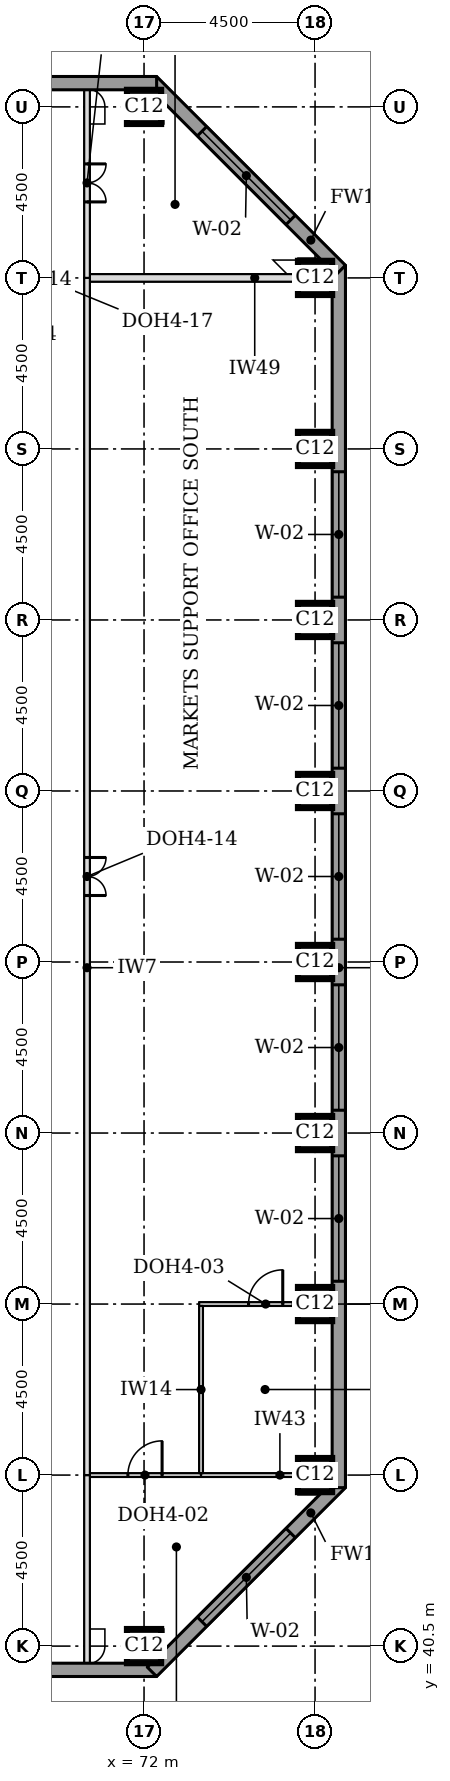
"""IFC4 building model, lengths in metres.
Left out: names, types, materials, properties, quantities, classifications, styles, units other than length and angle.
Written with IfcOpenShell. Run it as: python <this file> out.ifc"""

import sys

from ifc_helpers import new_model, si_unit, direction, frame, frame_2d, origin, origin_2d, place, context, subcontext, project, spatial, rectangle, extrude, element, fill, save


model = new_model("IFC4")
c1 = context("Model", 3, precision=1e-05, world=origin(), true_north=direction((0.0, 1.0)))
c2 = subcontext(c1, "Body", "Model", "MODEL_VIEW")
j1 = project(units=[si_unit("LENGTHUNIT", "METRE"), si_unit("PLANEANGLEUNIT", "RADIAN")], contexts=[c1])
p1 = place(None, origin())
s1 = spatial("IfcSite", under=j1, at=p1, CompositionType="ELEMENT")
p2 = place(p1, origin())
s2 = spatial("IfcBuilding", under=s1, at=p2, CompositionType="ELEMENT")
p3 = place(p2, frame((0.0, 0.0, 169.9)))
s3 = spatial("IfcBuildingStorey", under=s2, at=p3, CompositionType="ELEMENT", Elevation=169.9)
for number, where, z_axis, x_axis in (
    (1, (72.0, 40.5, 0.0), (0.0, 0.0, 1.0), (1.0, 0.0, 0.0)),
    (2, (76.5, 45.0, 0.0), (0.0, 0.0, 1.0), (1.0, 0.0, 0.0)),
    (3, (76.5, 49.5, 0.0), (0.0, 0.0, 1.0), (1.0, 0.0, 0.0)),
    (4, (76.5, 54.0, 0.0), (0.0, 0.0, 1.0), (1.0, 0.0, 0.0)),
    (5, (76.5, 58.5, 0.0), (0.0, 0.0, 1.0), (1.0, 0.0, 0.0)),
    (6, (76.5, 63.0, 0.0), (0.0, 0.0, 1.0), (1.0, 0.0, 0.0)),
    (7, (76.5, 67.5, 0.0), (0.0, 0.0, 1.0), (1.0, 0.0, 0.0)),
    (8, (76.5, 72.0, 0.0), (0.0, 0.0, 1.0), (1.0, 0.0, 0.0)),
    (9, (76.5, 76.5, 0.0), (0.0, 0.0, 1.0), (1.0, 0.0, 0.0)),
    (10, (72.0, 81.0, 0.0), (0.0, 0.0, 1.0), (1.0, 0.0, 0.0)),
):
    element("IfcColumn", number, at=place(p3, frame(where, z_axis=z_axis, x_axis=x_axis)), inside=s3, PredefinedType="COLUMN", context=c2, shape_type="SweptSolid", body=[
        extrude(rectangle(XDim=0.9, YDim=0.9, at=origin_2d()), origin(), (0.0, 0.0, 1.0), 3.7),
    ])
p4 = place(p3, frame((36.0, 39.875, 0.0), z_axis=(0.0, 0.0, 1.0), x_axis=(1.0, 0.0, 0.0)))
e11 = element("IfcWall", 11, at=p4, inside=s3, PredefinedType="STANDARD", context=c2, shape_type="SweptSolid", body=[
    extrude(rectangle(XDim=36.331, YDim=0.35, at=frame_2d((18.166, 0.0))), origin(), (0.0, 0.0, 1.0), 3.525),
])
p5 = place(p4, frame((5.1, 0.0, 0.9)))
e12 = element("IfcOpeningElement", 12, at=p5, cuts=e11, PredefinedType="OPENING", context=c2, shape_type="SweptSolid", body=[
    extrude(rectangle(XDim=3.3, YDim=1.9, at=frame_2d((1.65, 0.95))), frame((0.0, 0.185, 0.0), z_axis=(0.0, -1.0, 0.0), x_axis=(1.0, 0.0, 0.0)), (0.0, 0.0, 1.0), 0.37),
])
p6 = place(p4, frame((9.6, 0.0, 0.9)))
e13 = element("IfcOpeningElement", 13, at=p6, cuts=e11, PredefinedType="OPENING", context=c2, shape_type="SweptSolid", body=[
    extrude(rectangle(XDim=3.3, YDim=1.9, at=frame_2d((1.65, 0.95))), frame((0.0, 0.185, 0.0), z_axis=(0.0, -1.0, 0.0), x_axis=(1.0, 0.0, 0.0)), (0.0, 0.0, 1.0), 0.37),
])
p7 = place(p4, frame((14.1, 0.0, 0.9)))
e14 = element("IfcOpeningElement", 14, at=p7, cuts=e11, PredefinedType="OPENING", context=c2, shape_type="SweptSolid", body=[
    extrude(rectangle(XDim=3.3, YDim=1.9, at=frame_2d((1.65, 0.95))), frame((0.0, 0.185, 0.0), z_axis=(0.0, -1.0, 0.0), x_axis=(1.0, 0.0, 0.0)), (0.0, 0.0, 1.0), 0.37),
])
p8 = place(p4, frame((18.6, 0.0, 0.9)))
e15 = element("IfcOpeningElement", 15, at=p8, cuts=e11, PredefinedType="OPENING", context=c2, shape_type="SweptSolid", body=[
    extrude(rectangle(XDim=3.3, YDim=1.9, at=frame_2d((1.65, 0.95))), frame((0.0, 0.185, 0.0), z_axis=(0.0, -1.0, 0.0), x_axis=(1.0, 0.0, 0.0)), (0.0, 0.0, 1.0), 0.37),
])
p9 = place(p4, frame((23.1, 0.0, 0.9)))
e16 = element("IfcOpeningElement", 16, at=p9, cuts=e11, PredefinedType="OPENING", context=c2, shape_type="SweptSolid", body=[
    extrude(rectangle(XDim=3.3, YDim=1.9, at=frame_2d((1.65, 0.95))), frame((0.0, 0.185, 0.0), z_axis=(0.0, -1.0, 0.0), x_axis=(1.0, 0.0, 0.0)), (0.0, 0.0, 1.0), 0.37),
])
p10 = place(p4, frame((27.6, 0.0, 0.9)))
e17 = element("IfcOpeningElement", 17, at=p10, cuts=e11, PredefinedType="OPENING", context=c2, shape_type="SweptSolid", body=[
    extrude(rectangle(XDim=3.3, YDim=1.9, at=frame_2d((1.65, 0.95))), frame((0.0, 0.185, 0.0), z_axis=(0.0, -1.0, 0.0), x_axis=(1.0, 0.0, 0.0)), (0.0, 0.0, 1.0), 0.37),
])
p11 = place(p3, frame((72.208, 39.824, 0.0), z_axis=(0.0, 0.0, 1.0), x_axis=(0.707106781187, 0.707106781187, 0.0)))
e18 = element("IfcWall", 18, at=p11, inside=s3, PredefinedType="STANDARD", context=c2, shape_type="SweptSolid", body=[
    extrude(rectangle(XDim=7.027, YDim=0.35, at=frame_2d((3.513, 0.0))), origin(), (0.0, 0.0, 1.0), 3.525),
])
p12 = place(p11, frame((1.863, 0.0, 0.9)))
e19 = element("IfcOpeningElement", 19, at=p12, cuts=e18, PredefinedType="OPENING", context=c2, shape_type="SweptSolid", body=[
    extrude(rectangle(XDim=3.3, YDim=1.9, at=frame_2d((1.65, 0.95))), frame((0.0, 0.185, 0.0), z_axis=(0.0, -1.0, 0.0), x_axis=(1.0, 0.0, 0.0)), (0.0, 0.0, 1.0), 0.37),
])
p13 = place(p3, frame((77.125, 44.669, 0.0), z_axis=(0.0, 0.0, 1.0), x_axis=(0.0, 1.0, 0.0)))
e20 = element("IfcWall", 20, at=p13, inside=s3, PredefinedType="STANDARD", context=c2, shape_type="SweptSolid", body=[
    extrude(rectangle(XDim=32.163, YDim=0.35, at=frame_2d((16.081, 0.0))), origin(), (0.0, 0.0, 1.0), 3.525),
])
p14 = place(p13, frame((5.431, 0.0, 0.9)))
e21 = element("IfcOpeningElement", 21, at=p14, cuts=e20, PredefinedType="OPENING", context=c2, shape_type="SweptSolid", body=[
    extrude(rectangle(XDim=3.3, YDim=1.9, at=frame_2d((1.65, 0.95))), frame((0.0, 0.185, 0.0), z_axis=(0.0, -1.0, 0.0), x_axis=(1.0, 0.0, 0.0)), (0.0, 0.0, 1.0), 0.37),
])
p15 = place(p13, frame((9.931, 0.0, 0.9)))
e22 = element("IfcOpeningElement", 22, at=p15, cuts=e20, PredefinedType="OPENING", context=c2, shape_type="SweptSolid", body=[
    extrude(rectangle(XDim=3.3, YDim=1.9, at=frame_2d((1.65, 0.95))), frame((0.0, 0.185, 0.0), z_axis=(0.0, -1.0, 0.0), x_axis=(1.0, 0.0, 0.0)), (0.0, 0.0, 1.0), 0.37),
])
p16 = place(p13, frame((14.431, 0.0, 0.9)))
e23 = element("IfcOpeningElement", 23, at=p16, cuts=e20, PredefinedType="OPENING", context=c2, shape_type="SweptSolid", body=[
    extrude(rectangle(XDim=3.3, YDim=1.9, at=frame_2d((1.65, 0.95))), frame((0.0, 0.185, 0.0), z_axis=(0.0, -1.0, 0.0), x_axis=(1.0, 0.0, 0.0)), (0.0, 0.0, 1.0), 0.37),
])
p17 = place(p13, frame((18.931, 0.0, 0.9)))
e24 = element("IfcOpeningElement", 24, at=p17, cuts=e20, PredefinedType="OPENING", context=c2, shape_type="SweptSolid", body=[
    extrude(rectangle(XDim=3.3, YDim=1.9, at=frame_2d((1.65, 0.95))), frame((0.0, 0.185, 0.0), z_axis=(0.0, -1.0, 0.0), x_axis=(1.0, 0.0, 0.0)), (0.0, 0.0, 1.0), 0.37),
])
p18 = place(p13, frame((23.431, 0.0, 0.9)))
e25 = element("IfcOpeningElement", 25, at=p18, cuts=e20, PredefinedType="OPENING", context=c2, shape_type="SweptSolid", body=[
    extrude(rectangle(XDim=3.3, YDim=1.9, at=frame_2d((1.65, 0.95))), frame((0.0, 0.185, 0.0), z_axis=(0.0, -1.0, 0.0), x_axis=(1.0, 0.0, 0.0)), (0.0, 0.0, 1.0), 0.37),
])
p19 = place(p3, frame((77.176, 76.708, 0.0), z_axis=(0.0, 0.0, 1.0), x_axis=(-0.707106781187, 0.707106781187, 0.0)))
e26 = element("IfcWall", 26, at=p19, inside=s3, PredefinedType="STANDARD", context=c2, shape_type="SweptSolid", body=[
    extrude(rectangle(XDim=7.027, YDim=0.35, at=frame_2d((3.513, 0.0))), origin(), (0.0, 0.0, 1.0), 3.525),
])
p20 = place(p19, frame((1.863, 0.0, 0.9)))
e27 = element("IfcOpeningElement", 27, at=p20, cuts=e26, PredefinedType="OPENING", context=c2, shape_type="SweptSolid", body=[
    extrude(rectangle(XDim=3.3, YDim=1.9, at=frame_2d((1.65, 0.95))), frame((0.0, 0.185, 0.0), z_axis=(0.0, -1.0, 0.0), x_axis=(1.0, 0.0, 0.0)), (0.0, 0.0, 1.0), 0.37),
])
p21 = place(p3, frame((72.331, 81.625, 0.0), z_axis=(0.0, 0.0, 1.0), x_axis=(-1.0, 0.0, 0.0)))
e28 = element("IfcWall", 28, at=p21, inside=s3, PredefinedType="STANDARD", context=c2, shape_type="SweptSolid", body=[
    extrude(rectangle(XDim=32.163, YDim=0.35, at=frame_2d((16.081, 0.0))), origin(), (0.0, 0.0, 1.0), 3.525),
])
p22 = place(p21, frame((5.431, 0.0, 0.9)))
e29 = element("IfcOpeningElement", 29, at=p22, cuts=e28, PredefinedType="OPENING", context=c2, shape_type="SweptSolid", body=[
    extrude(rectangle(XDim=3.3, YDim=1.9, at=frame_2d((1.65, 0.95))), frame((0.0, 0.185, 0.0), z_axis=(0.0, -1.0, 0.0), x_axis=(1.0, 0.0, 0.0)), (0.0, 0.0, 1.0), 0.37),
])
p23 = place(p21, frame((9.931, 0.0, 0.9)))
e30 = element("IfcOpeningElement", 30, at=p23, cuts=e28, PredefinedType="OPENING", context=c2, shape_type="SweptSolid", body=[
    extrude(rectangle(XDim=3.3, YDim=1.9, at=frame_2d((1.65, 0.95))), frame((0.0, 0.185, 0.0), z_axis=(0.0, -1.0, 0.0), x_axis=(1.0, 0.0, 0.0)), (0.0, 0.0, 1.0), 0.37),
])
p24 = place(p21, frame((14.431, 0.0, 0.9)))
e31 = element("IfcOpeningElement", 31, at=p24, cuts=e28, PredefinedType="OPENING", context=c2, shape_type="SweptSolid", body=[
    extrude(rectangle(XDim=3.3, YDim=1.9, at=frame_2d((1.65, 0.95))), frame((0.0, 0.185, 0.0), z_axis=(0.0, -1.0, 0.0), x_axis=(1.0, 0.0, 0.0)), (0.0, 0.0, 1.0), 0.37),
])
p25 = place(p21, frame((18.931, 0.0, 0.9)))
e32 = element("IfcOpeningElement", 32, at=p25, cuts=e28, PredefinedType="OPENING", context=c2, shape_type="SweptSolid", body=[
    extrude(rectangle(XDim=3.3, YDim=1.9, at=frame_2d((1.65, 0.95))), frame((0.0, 0.185, 0.0), z_axis=(0.0, -1.0, 0.0), x_axis=(1.0, 0.0, 0.0)), (0.0, 0.0, 1.0), 0.37),
])
p26 = place(p21, frame((23.431, 0.0, 0.9)))
e33 = element("IfcOpeningElement", 33, at=p26, cuts=e28, PredefinedType="OPENING", context=c2, shape_type="SweptSolid", body=[
    extrude(rectangle(XDim=3.3, YDim=1.9, at=frame_2d((1.65, 0.95))), frame((0.0, 0.185, 0.0), z_axis=(0.0, -1.0, 0.0), x_axis=(1.0, 0.0, 0.0)), (0.0, 0.0, 1.0), 0.37),
])
p27 = place(p3, frame((70.575, 45.0, 0.0), z_axis=(0.0, 0.0, 1.0), x_axis=(1.0, 0.0, 0.0)))
e34 = element("IfcWall", 34, at=p27, inside=s3, PredefinedType="PARTITIONING", context=c2, shape_type="SweptSolid", body=[
    extrude(rectangle(XDim=2.925, YDim=0.1, at=frame_2d((1.462, 0.0))), origin(), (0.0, 0.0, 1.0), 3.096),
])
p28 = place(p27, frame((1.0, 0.0, 0.0)))
e35 = element("IfcOpeningElement", 35, at=p28, cuts=e34, PredefinedType="OPENING", context=c2, shape_type="SweptSolid", body=[
    extrude(rectangle(XDim=0.9, YDim=2.1, at=frame_2d((0.45, 1.05))), frame((0.0, 0.06, 0.0), z_axis=(0.0, -1.0, 0.0), x_axis=(1.0, 0.0, 0.0)), (0.0, 0.0, 1.0), 0.12),
])
p29 = place(p3, frame((73.5, 45.0, 0.0), z_axis=(0.0, 0.0, 1.0), x_axis=(1.0, 0.0, 0.0)))
e36 = element("IfcWall", 36, at=p29, inside=s3, PredefinedType="PARTITIONING", context=c2, shape_type="SweptSolid", body=[
    extrude(rectangle(XDim=2.55, YDim=0.1, at=frame_2d((1.275, 0.0))), origin(), (0.0, 0.0, 1.0), 3.096),
])
p30 = place(p3, frame((73.45, 49.5, 0.0), z_axis=(0.0, 0.0, 1.0), x_axis=(1.0, 0.0, 0.0)))
e37 = element("IfcWall", 37, at=p30, inside=s3, PredefinedType="PARTITIONING", context=c2, shape_type="SweptSolid", body=[
    extrude(rectangle(XDim=3.5, YDim=0.1, at=frame_2d((1.75, 0.0))), origin(), (0.0, 0.0, 1.0), 3.55),
])
p31 = place(p30, frame((1.3, 0.0, 0.0)))
e38 = element("IfcOpeningElement", 38, at=p31, cuts=e37, PredefinedType="OPENING", context=c2, shape_type="SweptSolid", body=[
    extrude(rectangle(XDim=0.9, YDim=2.1, at=frame_2d((0.45, 1.05))), frame((0.0, 0.06, 0.0), z_axis=(0.0, -1.0, 0.0), x_axis=(1.0, 0.0, 0.0)), (0.0, 0.0, 1.0), 0.12),
])
p32 = place(p3, frame((70.575, 76.5, 0.0), z_axis=(0.0, 0.0, 1.0), x_axis=(1.0, 0.0, 0.0)))
e39 = element("IfcWall", 39, at=p32, inside=s3, PredefinedType="PARTITIONING", context=c2, shape_type="SweptSolid", body=[
    extrude(rectangle(XDim=5.475, YDim=0.2, at=frame_2d((2.738, 0.0))), origin(), (0.0, 0.0, 1.0), 3.096),
])
p33 = place(p3, frame((70.5, 40.05, 0.0), z_axis=(0.0, 0.0, 1.0), x_axis=(0.0, 1.0, 0.0)))
e40 = element("IfcWall", 40, at=p33, inside=s3, PredefinedType="PARTITIONING", context=c2, shape_type="SweptSolid", body=[
    extrude(rectangle(XDim=4.95, YDim=0.15, at=frame_2d((2.475, 0.0))), origin(), (0.0, 0.0, 1.0), 3.55),
])
p34 = place(p3, frame((70.5, 45.0, 0.0), z_axis=(0.0, 0.0, 1.0), x_axis=(0.0, 1.0, 0.0)))
e41 = element("IfcWall", 41, at=p34, inside=s3, PredefinedType="PARTITIONING", context=c2, shape_type="SweptSolid", body=[
    extrude(rectangle(XDim=31.5, YDim=0.15, at=frame_2d((15.75, 0.0))), origin(), (0.0, 0.0, 1.0), 3.55),
])
p35 = place(p34, frame((15.25, 0.0, 0.0)))
e42 = element("IfcOpeningElement", 42, at=p35, cuts=e41, PredefinedType="OPENING", context=c2, shape_type="SweptSolid", body=[
    extrude(rectangle(XDim=1.0, YDim=2.1, at=frame_2d((0.5, 1.05))), frame((0.0, 0.085, 0.0), z_axis=(0.0, -1.0, 0.0), x_axis=(1.0, 0.0, 0.0)), (0.0, 0.0, 1.0), 0.17),
])
p36 = place(p3, frame((73.5, 45.05, 0.0), z_axis=(0.0, 0.0, 1.0), x_axis=(0.0, 1.0, 0.0)))
e43 = element("IfcWall", 43, at=p36, inside=s3, PredefinedType="PARTITIONING", context=c2, shape_type="SweptSolid", body=[
    extrude(rectangle(XDim=4.4, YDim=0.1, at=frame_2d((2.2, 0.0))), origin(), (0.0, 0.0, 1.0), 3.55),
])
p37 = place(p3, frame((70.5, 76.5, 0.0), z_axis=(0.0, 0.0, 1.0), x_axis=(0.0, 1.0, 0.0)))
e44 = element("IfcWall", 44, at=p37, inside=s3, PredefinedType="PARTITIONING", context=c2, shape_type="SweptSolid", body=[
    extrude(rectangle(XDim=4.95, YDim=0.15, at=frame_2d((2.475, 0.0))), origin(), (0.0, 0.0, 1.0), 3.55),
])
p38 = place(p37, frame((2.0, 0.0, 0.0)))
e45 = element("IfcOpeningElement", 45, at=p38, cuts=e44, PredefinedType="OPENING", context=c2, shape_type="SweptSolid", body=[
    extrude(rectangle(XDim=1.0, YDim=2.1, at=frame_2d((0.5, 1.05))), frame((0.0, 0.085, 0.0), z_axis=(0.0, -1.0, 0.0), x_axis=(1.0, 0.0, 0.0)), (0.0, 0.0, 1.0), 0.17),
])
p39 = place(p12, origin())
e46 = element("IfcWindow", 46, at=p39, inside=s3, PartitioningType="SINGLE_PANEL", PredefinedType="WINDOW", context=c2, shape_type="SweptSolid", body=[
    extrude(rectangle(XDim=3.3, YDim=1.9, at=frame_2d((1.65, 0.95))), frame((0.0, 0.085, 0.0), z_axis=(0.0, -1.0, 0.0), x_axis=(1.0, 0.0, 0.0)), (0.0, 0.0, 1.0), 0.06),
])
fill(e19, e46)
p40 = place(p14, origin())
e47 = element("IfcWindow", 47, at=p40, inside=s3, PartitioningType="SINGLE_PANEL", PredefinedType="WINDOW", context=c2, shape_type="SweptSolid", body=[
    extrude(rectangle(XDim=3.3, YDim=1.9, at=frame_2d((1.65, 0.95))), frame((0.0, 0.085, 0.0), z_axis=(0.0, -1.0, 0.0), x_axis=(1.0, 0.0, 0.0)), (0.0, 0.0, 1.0), 0.06),
])
fill(e21, e47)
p41 = place(p15, origin())
e48 = element("IfcWindow", 48, at=p41, inside=s3, PartitioningType="SINGLE_PANEL", PredefinedType="WINDOW", context=c2, shape_type="SweptSolid", body=[
    extrude(rectangle(XDim=3.3, YDim=1.9, at=frame_2d((1.65, 0.95))), frame((0.0, 0.085, 0.0), z_axis=(0.0, -1.0, 0.0), x_axis=(1.0, 0.0, 0.0)), (0.0, 0.0, 1.0), 0.06),
])
fill(e22, e48)
p42 = place(p16, origin())
e49 = element("IfcWindow", 49, at=p42, inside=s3, PartitioningType="SINGLE_PANEL", PredefinedType="WINDOW", context=c2, shape_type="SweptSolid", body=[
    extrude(rectangle(XDim=3.3, YDim=1.9, at=frame_2d((1.65, 0.95))), frame((0.0, 0.085, 0.0), z_axis=(0.0, -1.0, 0.0), x_axis=(1.0, 0.0, 0.0)), (0.0, 0.0, 1.0), 0.06),
])
fill(e23, e49)
p43 = place(p17, origin())
e50 = element("IfcWindow", 50, at=p43, inside=s3, PartitioningType="SINGLE_PANEL", PredefinedType="WINDOW", context=c2, shape_type="SweptSolid", body=[
    extrude(rectangle(XDim=3.3, YDim=1.9, at=frame_2d((1.65, 0.95))), frame((0.0, 0.085, 0.0), z_axis=(0.0, -1.0, 0.0), x_axis=(1.0, 0.0, 0.0)), (0.0, 0.0, 1.0), 0.06),
])
fill(e24, e50)
p44 = place(p18, origin())
e51 = element("IfcWindow", 51, at=p44, inside=s3, PartitioningType="SINGLE_PANEL", PredefinedType="WINDOW", context=c2, shape_type="SweptSolid", body=[
    extrude(rectangle(XDim=3.3, YDim=1.9, at=frame_2d((1.65, 0.95))), frame((0.0, 0.085, 0.0), z_axis=(0.0, -1.0, 0.0), x_axis=(1.0, 0.0, 0.0)), (0.0, 0.0, 1.0), 0.06),
])
fill(e25, e51)
p45 = place(p20, origin())
e52 = element("IfcWindow", 52, at=p45, inside=s3, PartitioningType="SINGLE_PANEL", PredefinedType="WINDOW", context=c2, shape_type="SweptSolid", body=[
    extrude(rectangle(XDim=3.3, YDim=1.9, at=frame_2d((1.65, 0.95))), frame((0.0, 0.085, 0.0), z_axis=(0.0, -1.0, 0.0), x_axis=(1.0, 0.0, 0.0)), (0.0, 0.0, 1.0), 0.06),
])
fill(e27, e52)
p46 = place(p35, frame((1.0, 0.0, 0.0), z_axis=(0.0, 0.0, 1.0), x_axis=(-1.0, 0.0, 0.0)))
e53 = element("IfcDoor", 53, at=p46, inside=s3, OperationType="DOUBLE_DOOR_SINGLE_SWING", PredefinedType="DOOR", context=c2, shape_type="SweptSolid", body=[
    extrude(rectangle(XDim=1.0, YDim=2.1, at=frame_2d((0.5, 1.05))), frame((0.0, 0.025, 0.0), z_axis=(0.0, -1.0, 0.0), x_axis=(1.0, 0.0, 0.0)), (0.0, 0.0, 1.0), 0.05),
])
fill(e42, e53)
p47 = place(p28, origin())
e54 = element("IfcDoor", 54, at=p47, inside=s3, OperationType="SINGLE_SWING_RIGHT", PredefinedType="DOOR", context=c2, shape_type="SweptSolid", body=[
    extrude(rectangle(XDim=0.9, YDim=2.1, at=frame_2d((0.45, 1.05))), frame((0.0, 0.025, 0.0), z_axis=(0.0, -1.0, 0.0), x_axis=(1.0, 0.0, 0.0)), (0.0, 0.0, 1.0), 0.05),
])
fill(e35, e54)
p48 = place(p31, origin())
e55 = element("IfcDoor", 55, at=p48, inside=s3, OperationType="SINGLE_SWING_RIGHT", PredefinedType="DOOR", context=c2, shape_type="SweptSolid", body=[
    extrude(rectangle(XDim=0.9, YDim=2.1, at=frame_2d((0.45, 1.05))), frame((0.0, 0.025, 0.0), z_axis=(0.0, -1.0, 0.0), x_axis=(1.0, 0.0, 0.0)), (0.0, 0.0, 1.0), 0.05),
])
fill(e38, e55)
p49 = place(p38, frame((1.0, 0.0, 0.0), z_axis=(0.0, 0.0, 1.0), x_axis=(-1.0, 0.0, 0.0)))
e56 = element("IfcDoor", 56, at=p49, inside=s3, OperationType="DOUBLE_DOOR_SINGLE_SWING", PredefinedType="DOOR", context=c2, shape_type="SweptSolid", body=[
    extrude(rectangle(XDim=1.0, YDim=2.1, at=frame_2d((0.5, 1.05))), frame((0.0, 0.025, 0.0), z_axis=(0.0, -1.0, 0.0), x_axis=(1.0, 0.0, 0.0)), (0.0, 0.0, 1.0), 0.05),
])
fill(e45, e56)
save(model, sys.argv[1])
